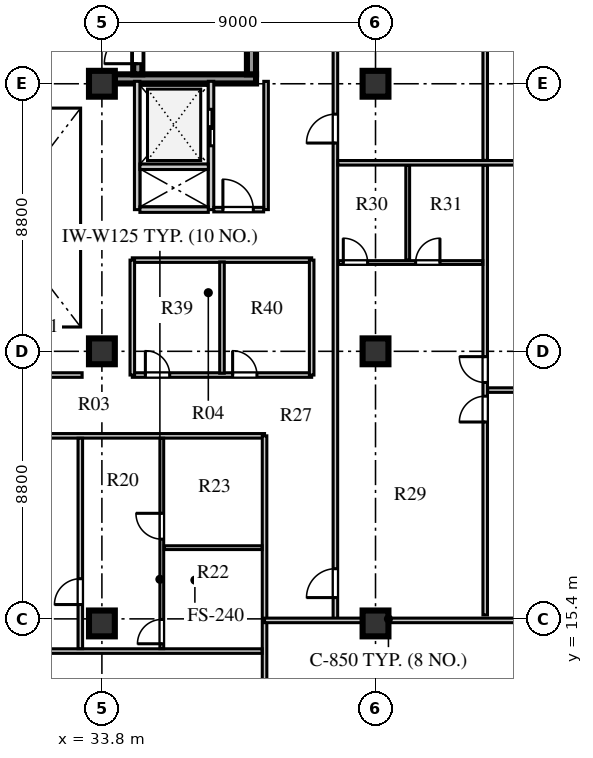
"""IFC4 building model, lengths in metres.
Left out: names, types, materials, properties, quantities, classifications, styles, units other than length and angle.
Written with IfcOpenShell. Run it as: python <this file> out.ifc"""

import sys

from ifc_helpers import new_model, si_unit, direction, frame, frame_2d, origin, origin_2d, place, context, subcontext, project, spatial, rectangle, extrude, element, fill, save


model = new_model("IFC4")
c1 = context("Model", 3, precision=1e-05, world=origin(), true_north=direction((0.0, 1.0)))
c2 = subcontext(c1, "Body", "Model", "MODEL_VIEW")
j1 = project(units=[si_unit("LENGTHUNIT", "METRE"), si_unit("PLANEANGLEUNIT", "RADIAN")], contexts=[c1])
p1 = place(None, origin())
s1 = spatial("IfcSite", under=j1, at=p1, CompositionType="ELEMENT")
p2 = place(p1, origin())
s2 = spatial("IfcBuilding", under=s1, at=p2, CompositionType="ELEMENT")
p3 = place(p2, frame((0.0, 0.0, 237.5)))
s3 = spatial("IfcBuildingStorey", under=s2, at=p3, CompositionType="ELEMENT", Elevation=237.5)
p4 = place(p3, frame((34.225, 33.16, 0.0), z_axis=(0.0, 0.0, 1.0), x_axis=(1.0, 0.0, 0.0)))
e1 = element("IfcWall", 1, at=p4, inside=s3, PredefinedType="SHEAR", context=c2, shape_type="SweptSolid", body=[
    extrude(rectangle(XDim=4.645, YDim=0.3, at=frame_2d((2.323, 0.0))), origin(), (0.0, 0.0, 1.0), 3.66),
])
p5 = place(p3, frame((34.98, 33.31, 0.0), z_axis=(0.0, 0.0, 1.0), x_axis=(0.0, 1.0, 0.0)))
e2 = element("IfcWall", 2, at=p5, inside=s3, PredefinedType="SHEAR", context=c2, shape_type="SweptSolid", body=[
    extrude(rectangle(XDim=8.03, YDim=0.3, at=frame_2d((4.015, 0.0))), origin(), (0.0, 0.0, 1.0), 3.66),
])
p6 = place(p5, frame((0.35, 0.0, 0.0)))
e3 = element("IfcOpeningElement", 3, at=p6, cuts=e2, PredefinedType="OPENING", context=c2, shape_type="SweptSolid", body=[
    extrude(rectangle(XDim=1.1, YDim=2.1, at=frame_2d((0.55, 1.05))), frame((0.0, 0.16, 0.0), z_axis=(0.0, -1.0, 0.0), x_axis=(1.0, 0.0, 0.0)), (0.0, 0.0, 1.0), 0.32),
])
p7 = place(p3, frame((38.72, 33.31, 0.0), z_axis=(0.0, 0.0, 1.0), x_axis=(0.0, 1.0, 0.0)))
e4 = element("IfcWall", 4, at=p7, inside=s3, PredefinedType="SHEAR", context=c2, shape_type="SweptSolid", body=[
    extrude(rectangle(XDim=8.03, YDim=0.3, at=frame_2d((4.015, 0.0))), origin(), (0.0, 0.0, 1.0), 3.66),
])
for number, where, z_axis, x_axis in (
    (5, (33.8, 15.25, 0.0), (0.0, 0.0, 1.0), (1.0, 0.0, 0.0)),
    (6, (33.8, 24.2, 0.0), (0.0, 0.0, 1.0), (1.0, 0.0, 0.0)),
    (7, (33.8, 33.0, 0.0), (0.0, 0.0, 1.0), (1.0, 0.0, 0.0)),
    (8, (42.8, 15.25, 0.0), (0.0, 0.0, 1.0), (1.0, 0.0, 0.0)),
    (9, (42.8, 24.2, 0.0), (0.0, 0.0, 1.0), (1.0, 0.0, 0.0)),
    (10, (42.8, 33.0, 0.0), (0.0, 0.0, 1.0), (1.0, 0.0, 0.0)),
):
    element("IfcColumn", number, at=place(p3, frame(where, z_axis=z_axis, x_axis=x_axis)), inside=s3, PredefinedType="COLUMN", context=c2, shape_type="SweptSolid", body=[
        extrude(rectangle(XDim=0.85, YDim=0.85, at=origin_2d()), origin(), (0.0, 0.0, 1.0), 3.66),
    ])
p8 = place(p3, frame((34.96, 28.86, 0.0), z_axis=(0.0, 0.0, 1.0), x_axis=(0.0, 1.0, 0.0)))
e11 = element("IfcWall", 11, at=p8, inside=s3, PredefinedType="SOLIDWALL", context=c2, shape_type="SweptSolid", body=[
    extrude(rectangle(XDim=4.22, YDim=0.18, at=frame_2d((2.11, 0.0))), origin(), (0.0, 0.0, 1.0), 3.66),
])
p9 = place(p3, frame((37.39, 28.86, 0.0), z_axis=(0.0, 0.0, 1.0), x_axis=(0.0, 1.0, 0.0)))
e12 = element("IfcWall", 12, at=p9, inside=s3, PredefinedType="SOLIDWALL", context=c2, shape_type="SweptSolid", body=[
    extrude(rectangle(XDim=4.22, YDim=0.18, at=frame_2d((2.11, 0.0))), origin(), (0.0, 0.0, 1.0), 3.66),
])
p10 = place(p9, frame((2.1, 0.0, 0.0)))
e13 = element("IfcOpeningElement", 13, at=p10, cuts=e12, PredefinedType="OPENING", context=c2, shape_type="SweptSolid", body=[
    extrude(rectangle(XDim=1.2, YDim=2.12, at=frame_2d((0.6, 1.06))), frame((0.0, 0.1, 0.0), z_axis=(0.0, -1.0, 0.0), x_axis=(1.0, 0.0, 0.0)), (0.0, 0.0, 1.0), 0.2),
])
for number, where, z_axis, x_axis in (
    (14, (35.05, 28.86, 0.0), (0.0, 0.0, 1.0), (1.0, 0.0, 0.0)),
    (15, (35.05, 30.27, 0.0), (0.0, 0.0, 1.0), (1.0, 0.0, 0.0)),
):
    element("IfcWall", number, at=place(p3, frame(where, z_axis=z_axis, x_axis=x_axis)), inside=s3, PredefinedType="SOLIDWALL", context=c2, shape_type="SweptSolid", body=[
        extrude(rectangle(XDim=2.25, YDim=0.18, at=frame_2d((1.125, 0.0))), origin(), (0.0, 0.0, 1.0), 3.66),
    ])
p11 = place(p3, frame((39.2, 28.86, 0.0), z_axis=(0.0, 0.0, 1.0), x_axis=(0.0, 1.0, 0.0)))
e16 = element("IfcWall", 16, at=p11, inside=s3, PredefinedType="PARTITIONING", context=c2, shape_type="SweptSolid", body=[
    extrude(rectangle(XDim=4.22, YDim=0.15, at=frame_2d((2.11, 0.0))), origin(), (0.0, 0.0, 1.0), 3.66),
])
p12 = place(p3, frame((37.48, 28.86, 0.0), z_axis=(0.0, 0.0, 1.0), x_axis=(1.0, 0.0, 0.0)))
e17 = element("IfcWall", 17, at=p12, inside=s3, PredefinedType="PARTITIONING", context=c2, shape_type="SweptSolid", body=[
    extrude(rectangle(XDim=1.64, YDim=0.15, at=frame_2d((0.82, 0.0))), origin(), (0.0, 0.0, 1.0), 3.66),
])
p13 = place(p12, frame((0.3, 0.0, 0.0)))
e18 = element("IfcOpeningElement", 18, at=p13, cuts=e17, PredefinedType="OPENING", context=c2, shape_type="SweptSolid", body=[
    extrude(rectangle(XDim=1.0, YDim=2.1, at=frame_2d((0.5, 1.05))), frame((0.0, 0.085, 0.0), z_axis=(0.0, -1.0, 0.0), x_axis=(1.0, 0.0, 0.0)), (0.0, 0.0, 1.0), 0.17),
])
p14 = place(p3, frame((27.08, 21.42, 0.0), z_axis=(0.0, 0.0, 1.0), x_axis=(1.0, 0.0, 0.0)))
e19 = element("IfcWall", 19, at=p14, inside=s3, PredefinedType="PARTITIONING", context=c2, shape_type="SweptSolid", body=[
    extrude(rectangle(XDim=12.07, YDim=0.15, at=frame_2d((6.035, 0.0))), origin(), (0.0, 0.0, 1.0), 3.31),
])
p15 = place(p14, frame((0.63, 0.0, 0.0)))
e20 = element("IfcOpeningElement", 20, at=p15, cuts=e19, PredefinedType="OPENING", context=c2, shape_type="SweptSolid", body=[
    extrude(rectangle(XDim=0.95, YDim=2.1, at=frame_2d((0.475, 1.05))), frame((0.0, 0.085, 0.0), z_axis=(0.0, -1.0, 0.0), x_axis=(1.0, 0.0, 0.0)), (0.0, 0.0, 1.0), 0.17),
])
p16 = place(p3, frame((27.15, 23.42, 0.0), z_axis=(0.0, 0.0, 1.0), x_axis=(1.0, 0.0, 0.0)))
e21 = element("IfcWall", 21, at=p16, inside=s3, PredefinedType="PARTITIONING", context=c2, shape_type="SweptSolid", body=[
    extrude(rectangle(XDim=6.0, YDim=0.15, at=frame_2d((3.0, 0.0))), origin(), (0.0, 0.0, 1.0), 3.66),
])
p17 = place(p3, frame((39.15, 7.88, 0.0), z_axis=(0.0, 0.0, 1.0), x_axis=(0.0, 1.0, 0.0)))
e22 = element("IfcWall", 22, at=p17, inside=s3, PredefinedType="PARTITIONING", context=c2, shape_type="SweptSolid", body=[
    extrude(rectangle(XDim=13.54, YDim=0.15, at=frame_2d((6.77, 0.0))), origin(), (0.0, 0.0, 1.0), 3.66),
])
p18 = place(p3, frame((27.24, 14.341, 0.0), z_axis=(0.0, 0.0, 1.0), x_axis=(1.0, 0.0, 0.0)))
e23 = element("IfcWall", 23, at=p18, inside=s3, PredefinedType="PARTITIONING", context=c2, shape_type="SweptSolid", body=[
    extrude(rectangle(XDim=11.83, YDim=0.15, at=frame_2d((5.915, 0.0))), origin(), (0.0, 0.0, 1.0), 3.66),
])
p19 = place(p18, frame((0.3, 0.0, 0.0)))
e24 = element("IfcOpeningElement", 24, at=p19, cuts=e23, PredefinedType="OPENING", context=c2, shape_type="SweptSolid", body=[
    extrude(rectangle(XDim=0.85, YDim=2.08, at=frame_2d((0.425, 1.04))), frame((0.0, 0.085, 0.0), z_axis=(0.0, -1.0, 0.0), x_axis=(1.0, 0.0, 0.0)), (0.0, 0.0, 1.0), 0.17),
])
p20 = place(p18, frame((3.135, 0.0, 0.0)))
e25 = element("IfcOpeningElement", 25, at=p20, cuts=e23, PredefinedType="OPENING", context=c2, shape_type="SweptSolid", body=[
    extrude(rectangle(XDim=0.85, YDim=2.08, at=frame_2d((0.425, 1.04))), frame((0.0, 0.085, 0.0), z_axis=(0.0, -1.0, 0.0), x_axis=(1.0, 0.0, 0.0)), (0.0, 0.0, 1.0), 0.17),
])
p21 = place(p3, frame((35.77, 14.421, 0.0), z_axis=(0.0, 0.0, 1.0), x_axis=(0.0, 1.0, 0.0)))
e26 = element("IfcWall", 26, at=p21, inside=s3, PredefinedType="PLUMBINGWALL", context=c2, shape_type="SweptSolid", body=[
    extrude(rectangle(XDim=6.919, YDim=0.125, at=frame_2d((3.459, 0.0))), origin(), (0.0, 0.0, 1.0), 3.66),
])
p22 = place(p21, frame((0.16, 0.0, 0.0)))
e27 = element("IfcOpeningElement", 27, at=p22, cuts=e26, PredefinedType="OPENING", context=c2, shape_type="SweptSolid", body=[
    extrude(rectangle(XDim=0.8, YDim=2.05, at=frame_2d((0.4, 1.025))), frame((0.0, 0.073, 0.0), z_axis=(0.0, -1.0, 0.0), x_axis=(1.0, 0.0, 0.0)), (0.0, 0.0, 1.0), 0.145),
])
p23 = place(p21, frame((3.601, 0.0, 0.0)))
e28 = element("IfcOpeningElement", 28, at=p23, cuts=e26, PredefinedType="OPENING", context=c2, shape_type="SweptSolid", body=[
    extrude(rectangle(XDim=0.85, YDim=2.08, at=frame_2d((0.425, 1.04))), frame((0.0, 0.073, 0.0), z_axis=(0.0, -1.0, 0.0), x_axis=(1.0, 0.0, 0.0)), (0.0, 0.0, 1.0), 0.145),
])
p24 = place(p3, frame((35.85, 17.742, 0.0), z_axis=(0.0, 0.0, 1.0), x_axis=(1.0, 0.0, 0.0)))
e29 = element("IfcWall", 29, at=p24, inside=s3, PredefinedType="PLUMBINGWALL", context=c2, shape_type="SweptSolid", body=[
    extrude(rectangle(XDim=3.22, YDim=0.125, at=frame_2d((1.61, 0.0))), origin(), (0.0, 0.0, 1.0), 3.66),
])
p25 = place(p3, frame((33.09, 14.421, 0.0), z_axis=(0.0, 0.0, 1.0), x_axis=(0.0, 1.0, 0.0)))
e30 = element("IfcWall", 30, at=p25, inside=s3, PredefinedType="PARTITIONING", context=c2, shape_type="SweptSolid", body=[
    extrude(rectangle(XDim=6.919, YDim=0.15, at=frame_2d((3.459, 0.0))), origin(), (0.0, 0.0, 1.0), 3.66),
])
p26 = place(p25, frame((1.45, 0.0, 0.0)))
e31 = element("IfcOpeningElement", 31, at=p26, cuts=e30, PredefinedType="OPENING", context=c2, shape_type="SweptSolid", body=[
    extrude(rectangle(XDim=0.85, YDim=2.08, at=frame_2d((0.425, 1.04))), frame((0.0, 0.085, 0.0), z_axis=(0.0, -1.0, 0.0), x_axis=(1.0, 0.0, 0.0)), (0.0, 0.0, 1.0), 0.17),
])
p27 = place(p3, frame((41.48, 15.35, 0.0), z_axis=(0.0, 0.0, 1.0), x_axis=(0.0, 1.0, 0.0)))
e32 = element("IfcWall", 32, at=p27, inside=s3, PredefinedType="PARTITIONING", context=c2, shape_type="SweptSolid", body=[
    extrude(rectangle(XDim=26.5, YDim=0.15, at=frame_2d((13.25, 0.0))), origin(), (0.0, 0.0, 1.0), 3.66),
])
p28 = place(p27, frame((0.75, 0.0, 0.0)))
e33 = element("IfcOpeningElement", 33, at=p28, cuts=e32, PredefinedType="OPENING", context=c2, shape_type="SweptSolid", body=[
    extrude(rectangle(XDim=0.95, YDim=2.1, at=frame_2d((0.475, 1.05))), frame((0.0, 0.085, 0.0), z_axis=(0.0, -1.0, 0.0), x_axis=(1.0, 0.0, 0.0)), (0.0, 0.0, 1.0), 0.17),
])
p29 = place(p27, frame((15.7, 0.0, 0.0)))
e34 = element("IfcOpeningElement", 34, at=p29, cuts=e32, PredefinedType="OPENING", context=c2, shape_type="SweptSolid", body=[
    extrude(rectangle(XDim=0.95, YDim=2.1, at=frame_2d((0.475, 1.05))), frame((0.0, 0.085, 0.0), z_axis=(0.0, -1.0, 0.0), x_axis=(1.0, 0.0, 0.0)), (0.0, 0.0, 1.0), 0.17),
])
p30 = place(p3, frame((39.15, 15.35, 0.0), z_axis=(0.0, 0.0, 1.0), x_axis=(1.0, 0.0, 0.0)))
e35 = element("IfcWall", 35, at=p30, inside=s3, PredefinedType="PARTITIONING", context=c2, shape_type="SweptSolid", body=[
    extrude(rectangle(XDim=11.37, YDim=0.15, at=frame_2d((5.685, 0.0))), origin(), (0.0, 0.0, 1.0), 3.06),
])
p31 = place(p3, frame((46.408, 15.53, 0.0), z_axis=(0.0, 0.0, 1.0), x_axis=(0.0, 1.0, 0.0)))
e36 = element("IfcWall", 36, at=p31, inside=s3, PredefinedType="PARTITIONING", context=c2, shape_type="SweptSolid", body=[
    extrude(rectangle(XDim=14.79, YDim=0.15, at=frame_2d((7.395, 0.0))), origin(), (0.0, 0.0, 1.0), 3.66),
])
p32 = place(p31, frame((6.345, 0.0, 0.0)))
e37 = element("IfcOpeningElement", 37, at=p32, cuts=e36, PredefinedType="OPENING", context=c2, shape_type="SweptSolid", body=[
    extrude(rectangle(XDim=0.85, YDim=2.08, at=frame_2d((0.425, 1.04))), frame((0.0, 0.085, 0.0), z_axis=(0.0, -1.0, 0.0), x_axis=(1.0, 0.0, 0.0)), (0.0, 0.0, 1.0), 0.17),
])
p33 = place(p31, frame((7.645, 0.0, 0.0)))
e38 = element("IfcOpeningElement", 38, at=p33, cuts=e36, PredefinedType="OPENING", context=c2, shape_type="SweptSolid", body=[
    extrude(rectangle(XDim=0.85, YDim=2.08, at=frame_2d((0.425, 1.04))), frame((0.0, 0.085, 0.0), z_axis=(0.0, -1.0, 0.0), x_axis=(1.0, 0.0, 0.0)), (0.0, 0.0, 1.0), 0.17),
])
p34 = place(p3, frame((41.58, 27.12, 0.0), z_axis=(0.0, 0.0, 1.0), x_axis=(1.0, 0.0, 0.0)))
e39 = element("IfcWall", 39, at=p34, inside=s3, PredefinedType="PLUMBINGWALL", context=c2, shape_type="SweptSolid", body=[
    extrude(rectangle(XDim=4.748, YDim=0.125, at=frame_2d((2.374, 0.0))), origin(), (0.0, 0.0, 1.0), 3.31),
])
p35 = place(p34, frame((0.16, 0.0, 0.0)))
e40 = element("IfcOpeningElement", 40, at=p35, cuts=e39, PredefinedType="OPENING", context=c2, shape_type="SweptSolid", body=[
    extrude(rectangle(XDim=0.8, YDim=2.05, at=frame_2d((0.4, 1.025))), frame((0.0, 0.073, 0.0), z_axis=(0.0, -1.0, 0.0), x_axis=(1.0, 0.0, 0.0)), (0.0, 0.0, 1.0), 0.145),
])
p36 = place(p34, frame((2.539, 0.0, 0.0)))
e41 = element("IfcOpeningElement", 41, at=p36, cuts=e39, PredefinedType="OPENING", context=c2, shape_type="SweptSolid", body=[
    extrude(rectangle(XDim=0.8, YDim=2.05, at=frame_2d((0.4, 1.025))), frame((0.0, 0.073, 0.0), z_axis=(0.0, -1.0, 0.0), x_axis=(1.0, 0.0, 0.0)), (0.0, 0.0, 1.0), 0.145),
])
p37 = place(p3, frame((43.859, 27.2, 0.0), z_axis=(0.0, 0.0, 1.0), x_axis=(0.0, 1.0, 0.0)))
e42 = element("IfcWall", 42, at=p37, inside=s3, PredefinedType="PLUMBINGWALL", context=c2, shape_type="SweptSolid", body=[
    extrude(rectangle(XDim=3.12, YDim=0.125, at=frame_2d((1.56, 0.0))), origin(), (0.0, 0.0, 1.0), 3.66),
])
p38 = place(p3, frame((46.488, 22.925, 0.0), z_axis=(0.0, 0.0, 1.0), x_axis=(1.0, 0.0, 0.0)))
e43 = element("IfcWall", 43, at=p38, inside=s3, PredefinedType="PARTITIONING", context=c2, shape_type="SweptSolid", body=[
    extrude(rectangle(XDim=4.032, YDim=0.15, at=frame_2d((2.016, 0.0))), origin(), (0.0, 0.0, 1.0), 3.66),
])
p39 = place(p3, frame((41.56, 30.4, 0.0), z_axis=(0.0, 0.0, 1.0), x_axis=(1.0, 0.0, 0.0)))
e44 = element("IfcWall", 44, at=p39, inside=s3, PredefinedType="PARTITIONING", context=c2, shape_type="SweptSolid", body=[
    extrude(rectangle(XDim=8.96, YDim=0.15, at=frame_2d((4.48, 0.0))), origin(), (0.0, 0.0, 1.0), 3.66),
])
p40 = place(p3, frame((46.408, 30.48, 0.0), z_axis=(0.0, 0.0, 1.0), x_axis=(0.0, 1.0, 0.0)))
e45 = element("IfcWall", 45, at=p40, inside=s3, PredefinedType="PARTITIONING", context=c2, shape_type="SweptSolid", body=[
    extrude(rectangle(XDim=11.19, YDim=0.15, at=frame_2d((5.595, 0.0))), origin(), (0.0, 0.0, 1.0), 3.66),
])
p41 = place(p40, frame((4.545, 0.0, 0.0)))
e46 = element("IfcOpeningElement", 46, at=p41, cuts=e45, PredefinedType="OPENING", context=c2, shape_type="SweptSolid", body=[
    extrude(rectangle(XDim=0.85, YDim=2.08, at=frame_2d((0.425, 1.04))), frame((0.0, 0.085, 0.0), z_axis=(0.0, -1.0, 0.0), x_axis=(1.0, 0.0, 0.0)), (0.0, 0.0, 1.0), 0.17),
])
p42 = place(p40, frame((5.845, 0.0, 0.0)))
e47 = element("IfcOpeningElement", 47, at=p42, cuts=e45, PredefinedType="OPENING", context=c2, shape_type="SweptSolid", body=[
    extrude(rectangle(XDim=0.85, YDim=2.08, at=frame_2d((0.425, 1.04))), frame((0.0, 0.085, 0.0), z_axis=(0.0, -1.0, 0.0), x_axis=(1.0, 0.0, 0.0)), (0.0, 0.0, 1.0), 0.17),
])
p43 = place(p3, frame((34.8, 23.42, 0.0), z_axis=(0.0, 0.0, 1.0), x_axis=(1.0, 0.0, 0.0)))
e48 = element("IfcWall", 48, at=p43, inside=s3, PredefinedType="PARTITIONING", context=c2, shape_type="SweptSolid", body=[
    extrude(rectangle(XDim=5.9, YDim=0.15, at=frame_2d((2.95, 0.0))), origin(), (0.0, 0.0, 1.0), 3.66),
])
p44 = place(p43, frame((0.43, 0.0, 0.0)))
e49 = element("IfcOpeningElement", 49, at=p44, cuts=e48, PredefinedType="OPENING", context=c2, shape_type="SweptSolid", body=[
    extrude(rectangle(XDim=0.8, YDim=2.05, at=frame_2d((0.4, 1.025))), frame((0.0, 0.085, 0.0), z_axis=(0.0, -1.0, 0.0), x_axis=(1.0, 0.0, 0.0)), (0.0, 0.0, 1.0), 0.17),
])
p45 = place(p43, frame((3.3, 0.0, 0.0)))
e50 = element("IfcOpeningElement", 50, at=p45, cuts=e48, PredefinedType="OPENING", context=c2, shape_type="SweptSolid", body=[
    extrude(rectangle(XDim=0.8, YDim=2.05, at=frame_2d((0.4, 1.025))), frame((0.0, 0.085, 0.0), z_axis=(0.0, -1.0, 0.0), x_axis=(1.0, 0.0, 0.0)), (0.0, 0.0, 1.0), 0.17),
])
p46 = place(p3, frame((34.8, 27.2, 0.0), z_axis=(0.0, 0.0, 1.0), x_axis=(1.0, 0.0, 0.0)))
e51 = element("IfcWall", 51, at=p46, inside=s3, PredefinedType="PARTITIONING", context=c2, shape_type="SweptSolid", body=[
    extrude(rectangle(XDim=5.9, YDim=0.15, at=frame_2d((2.95, 0.0))), origin(), (0.0, 0.0, 1.0), 3.31),
])
for number, where, z_axis, x_axis in (
    (52, (34.8, 23.42, 0.0), (0.0, 0.0, 1.0), (0.0, 1.0, 0.0)),
    (53, (40.7, 23.42, 0.0), (0.0, 0.0, 1.0), (0.0, 1.0, 0.0)),
):
    element("IfcWall", number, at=place(p3, frame(where, z_axis=z_axis, x_axis=x_axis)), inside=s3, PredefinedType="PARTITIONING", context=c2, shape_type="SweptSolid", body=[
        extrude(rectangle(XDim=3.78, YDim=0.15, at=frame_2d((1.89, 0.0))), origin(), (0.0, 0.0, 1.0), 3.66),
    ])
p47 = place(p3, frame((37.75, 23.48, 0.0), z_axis=(0.0, 0.0, 1.0), x_axis=(0.0, 1.0, 0.0)))
e54 = element("IfcWall", 54, at=p47, inside=s3, PredefinedType="PARTITIONING", context=c2, shape_type="SweptSolid", body=[
    extrude(rectangle(XDim=3.66, YDim=0.15, at=frame_2d((1.83, 0.0))), origin(), (0.0, 0.0, 1.0), 3.66),
])
p48 = place(p6, origin())
e55 = element("IfcDoor", 55, at=p48, inside=s3, OperationType="SINGLE_SWING_LEFT", PredefinedType="DOOR", context=c2, shape_type="SweptSolid", body=[
    extrude(rectangle(XDim=1.1, YDim=2.1, at=frame_2d((0.55, 1.05))), frame((0.0, 0.025, 0.0), z_axis=(0.0, -1.0, 0.0), x_axis=(1.0, 0.0, 0.0)), (0.0, 0.0, 1.0), 0.05),
])
fill(e3, e55)
p49 = place(p10, frame((1.2, 0.0, 0.0), z_axis=(0.0, 0.0, 1.0), x_axis=(-1.0, 0.0, 0.0)))
e56 = element("IfcDoor", 56, at=p49, inside=s3, OperationType="DOUBLE_DOOR_SLIDING", PredefinedType="DOOR", context=c2, shape_type="SweptSolid", body=[
    extrude(rectangle(XDim=1.2, YDim=2.12, at=frame_2d((0.6, 1.06))), frame((0.0, 0.025, 0.0), z_axis=(0.0, -1.0, 0.0), x_axis=(1.0, 0.0, 0.0)), (0.0, 0.0, 1.0), 0.05),
])
fill(e13, e56)
p50 = place(p13, origin())
e57 = element("IfcDoor", 57, at=p50, inside=s3, OperationType="SINGLE_SWING_LEFT", PredefinedType="DOOR", context=c2, shape_type="SweptSolid", body=[
    extrude(rectangle(XDim=1.0, YDim=2.1, at=frame_2d((0.5, 1.05))), frame((0.0, 0.025, 0.0), z_axis=(0.0, -1.0, 0.0), x_axis=(1.0, 0.0, 0.0)), (0.0, 0.0, 1.0), 0.05),
])
fill(e18, e57)
p51 = place(p26, origin())
e58 = element("IfcDoor", 58, at=p51, inside=s3, OperationType="SINGLE_SWING_LEFT", PredefinedType="DOOR", context=c2, shape_type="SweptSolid", body=[
    extrude(rectangle(XDim=0.85, YDim=2.08, at=frame_2d((0.425, 1.04))), frame((0.0, 0.025, 0.0), z_axis=(0.0, -1.0, 0.0), x_axis=(1.0, 0.0, 0.0)), (0.0, 0.0, 1.0), 0.05),
])
fill(e31, e58)
p52 = place(p22, origin())
e59 = element("IfcDoor", 59, at=p52, inside=s3, OperationType="SINGLE_SWING_LEFT", PredefinedType="DOOR", context=c2, shape_type="SweptSolid", body=[
    extrude(rectangle(XDim=0.8, YDim=2.05, at=frame_2d((0.4, 1.025))), frame((0.0, 0.025, 0.0), z_axis=(0.0, -1.0, 0.0), x_axis=(1.0, 0.0, 0.0)), (0.0, 0.0, 1.0), 0.05),
])
fill(e27, e59)
p53 = place(p23, origin())
e60 = element("IfcDoor", 60, at=p53, inside=s3, OperationType="SINGLE_SWING_RIGHT", PredefinedType="DOOR", context=c2, shape_type="SweptSolid", body=[
    extrude(rectangle(XDim=0.85, YDim=2.08, at=frame_2d((0.425, 1.04))), frame((0.0, 0.025, 0.0), z_axis=(0.0, -1.0, 0.0), x_axis=(1.0, 0.0, 0.0)), (0.0, 0.0, 1.0), 0.05),
])
fill(e28, e60)
p54 = place(p35, origin())
e61 = element("IfcDoor", 61, at=p54, inside=s3, OperationType="SINGLE_SWING_LEFT", PredefinedType="DOOR", context=c2, shape_type="SweptSolid", body=[
    extrude(rectangle(XDim=0.8, YDim=2.05, at=frame_2d((0.4, 1.025))), frame((0.0, 0.025, 0.0), z_axis=(0.0, -1.0, 0.0), x_axis=(1.0, 0.0, 0.0)), (0.0, 0.0, 1.0), 0.05),
])
fill(e40, e61)
p55 = place(p36, origin())
e62 = element("IfcDoor", 62, at=p55, inside=s3, OperationType="SINGLE_SWING_RIGHT", PredefinedType="DOOR", context=c2, shape_type="SweptSolid", body=[
    extrude(rectangle(XDim=0.8, YDim=2.05, at=frame_2d((0.4, 1.025))), frame((0.0, 0.025, 0.0), z_axis=(0.0, -1.0, 0.0), x_axis=(1.0, 0.0, 0.0)), (0.0, 0.0, 1.0), 0.05),
])
fill(e41, e62)
p56 = place(p32, origin())
e63 = element("IfcDoor", 63, at=p56, inside=s3, OperationType="SINGLE_SWING_LEFT", PredefinedType="DOOR", context=c2, shape_type="SweptSolid", body=[
    extrude(rectangle(XDim=0.85, YDim=2.08, at=frame_2d((0.425, 1.04))), frame((0.0, 0.025, 0.0), z_axis=(0.0, -1.0, 0.0), x_axis=(1.0, 0.0, 0.0)), (0.0, 0.0, 1.0), 0.05),
])
fill(e37, e63)
p57 = place(p33, origin())
e64 = element("IfcDoor", 64, at=p57, inside=s3, OperationType="SINGLE_SWING_RIGHT", PredefinedType="DOOR", context=c2, shape_type="SweptSolid", body=[
    extrude(rectangle(XDim=0.85, YDim=2.08, at=frame_2d((0.425, 1.04))), frame((0.0, 0.025, 0.0), z_axis=(0.0, -1.0, 0.0), x_axis=(1.0, 0.0, 0.0)), (0.0, 0.0, 1.0), 0.05),
])
fill(e38, e64)
p58 = place(p28, origin())
e65 = element("IfcDoor", 65, at=p58, inside=s3, OperationType="SINGLE_SWING_LEFT", PredefinedType="DOOR", context=c2, shape_type="SweptSolid", body=[
    extrude(rectangle(XDim=0.95, YDim=2.1, at=frame_2d((0.475, 1.05))), frame((0.0, 0.025, 0.0), z_axis=(0.0, -1.0, 0.0), x_axis=(1.0, 0.0, 0.0)), (0.0, 0.0, 1.0), 0.05),
])
fill(e33, e65)
p59 = place(p29, origin())
e66 = element("IfcDoor", 66, at=p59, inside=s3, OperationType="SINGLE_SWING_LEFT", PredefinedType="DOOR", context=c2, shape_type="SweptSolid", body=[
    extrude(rectangle(XDim=0.95, YDim=2.1, at=frame_2d((0.475, 1.05))), frame((0.0, 0.025, 0.0), z_axis=(0.0, -1.0, 0.0), x_axis=(1.0, 0.0, 0.0)), (0.0, 0.0, 1.0), 0.05),
])
fill(e34, e66)
p60 = place(p44, origin())
e67 = element("IfcDoor", 67, at=p60, inside=s3, OperationType="SINGLE_SWING_LEFT", PredefinedType="DOOR", context=c2, shape_type="SweptSolid", body=[
    extrude(rectangle(XDim=0.8, YDim=2.05, at=frame_2d((0.4, 1.025))), frame((0.0, 0.025, 0.0), z_axis=(0.0, -1.0, 0.0), x_axis=(1.0, 0.0, 0.0)), (0.0, 0.0, 1.0), 0.05),
])
fill(e49, e67)
p61 = place(p45, origin())
e68 = element("IfcDoor", 68, at=p61, inside=s3, OperationType="SINGLE_SWING_LEFT", PredefinedType="DOOR", context=c2, shape_type="SweptSolid", body=[
    extrude(rectangle(XDim=0.8, YDim=2.05, at=frame_2d((0.4, 1.025))), frame((0.0, 0.025, 0.0), z_axis=(0.0, -1.0, 0.0), x_axis=(1.0, 0.0, 0.0)), (0.0, 0.0, 1.0), 0.05),
])
fill(e50, e68)
save(model, sys.argv[1])
